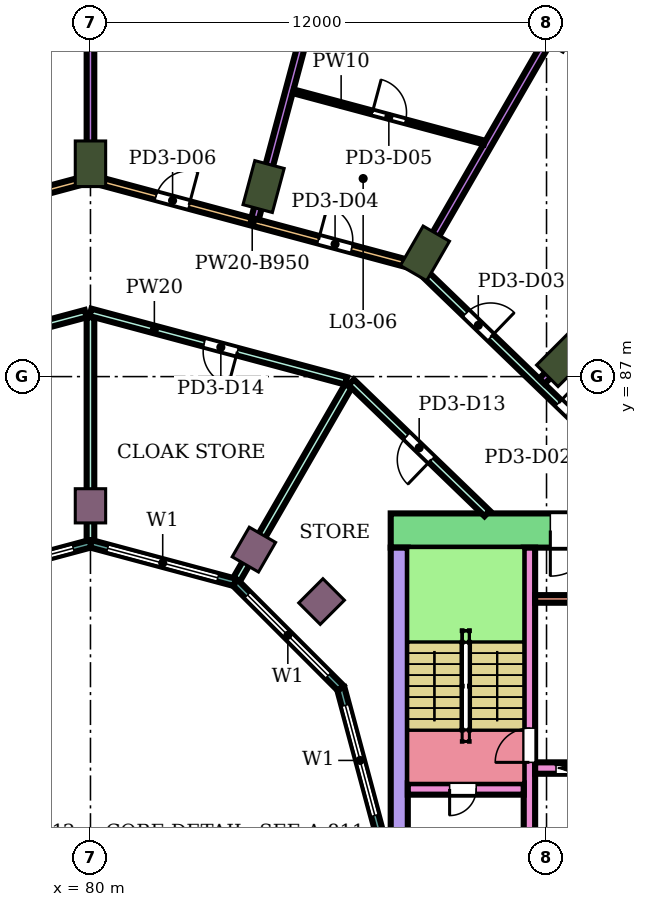
"""IFC4 building model, lengths in metres.
Left out: names, types, materials, properties, quantities, classifications, styles, units other than length and angle.
Written with IfcOpenShell. Run it as: python <this file> out.ifc"""

import sys

from ifc_helpers import new_model, si_unit, direction, frame, frame_2d, origin, origin_2d, place, context, subcontext, project, spatial, rectangle, extrude, element, fill, save


model = new_model("IFC4")
c1 = context("Model", 3, precision=1e-05, world=origin(), true_north=direction((0.0, 1.0)))
c2 = subcontext(c1, "Body", "Model", "MODEL_VIEW")
j1 = project(units=[si_unit("LENGTHUNIT", "METRE"), si_unit("PLANEANGLEUNIT", "RADIAN")], contexts=[c1])
p1 = place(None, origin())
s1 = spatial("IfcSite", under=j1, at=p1, CompositionType="ELEMENT")
p2 = place(p1, origin())
s2 = spatial("IfcBuilding", under=s1, at=p2, CompositionType="ELEMENT")
p3 = place(p2, frame((0.0, 0.0, 17.8)))
s3 = spatial("IfcBuildingStorey", under=s2, at=p3, CompositionType="ELEMENT", Elevation=17.8)
for number, where, z_axis, x_axis in (
    (1, (92.445, 87.445, 0.0), (0.0, 0.0, 1.0), (0.707, 0.707, 0.0)),
    (2, (88.8, 90.242, 0.0), (0.0, 0.0, 1.0), (0.5, 0.866, 0.0)),
    (3, (84.555, 92.0, 0.0), (0.0, 0.0, 1.0), (0.259, 0.966, 0.0)),
    (4, (80.0, 92.6, 0.0), (0.0, 0.0, 1.0), (0.0, 1.0, 0.0)),
):
    element("IfcColumn", number, at=place(p3, frame(where, z_axis=z_axis, x_axis=x_axis)), inside=s3, PredefinedType="COLUMN", context=c2, shape_type="SweptSolid", body=[
        extrude(rectangle(XDim=1.2, YDim=0.8, at=origin_2d()), origin(), (0.0, 0.0, 1.0), 6.0),
    ])
for number, where, z_axis, x_axis in (
    (5, (86.081, 81.081, 0.0), (0.0, 0.0, 1.0), (0.707, 0.707, 0.0)),
    (6, (84.3, 82.448, 0.0), (0.0, 0.0, 1.0), (0.5, 0.866, 0.0)),
    (7, (80.0, 83.6, 0.0), (0.0, 0.0, 1.0), (0.0, 1.0, 0.0)),
):
    element("IfcColumn", number, at=place(p3, frame(where, z_axis=z_axis, x_axis=x_axis)), inside=s3, PredefinedType="COLUMN", context=c2, shape_type="SweptSolid", body=[
        extrude(rectangle(XDim=0.9, YDim=0.8, at=origin_2d()), origin(), (0.0, 0.0, 1.0), 6.0),
    ])
p4 = place(p3, frame((87.9, 82.95, 0.0), z_axis=(0.0, 0.0, 1.0), x_axis=(1.0, 0.0, 0.0)))
e8 = element("IfcWall", 8, at=p4, inside=s3, PredefinedType="SHEAR", context=c2, shape_type="SweptSolid", body=[
    extrude(rectangle(XDim=14.6, YDim=0.9, at=frame_2d((7.3, 0.0))), origin(), (0.0, 0.0, 1.0), 5.55),
])
p5 = place(p4, frame((4.2, 0.0, 0.0)))
e9 = element("IfcOpeningElement", 9, at=p5, cuts=e8, PredefinedType="OPENING", context=c2, shape_type="SweptSolid", body=[
    extrude(rectangle(XDim=2.4, YDim=2.4, at=frame_2d((1.2, 1.2))), frame((0.0, 0.46, 0.0), z_axis=(0.0, -1.0, 0.0), x_axis=(1.0, 0.0, 0.0)), (0.0, 0.0, 1.0), 0.92),
])
p6 = place(p3, frame((88.125, 75.0, 0.0), z_axis=(0.0, 0.0, 1.0), x_axis=(0.0, 1.0, 0.0)))
e10 = element("IfcWall", 10, at=p6, inside=s3, PredefinedType="SHEAR", context=c2, shape_type="SweptSolid", body=[
    extrude(rectangle(XDim=7.5, YDim=0.45, at=frame_2d((3.75, 0.0))), origin(), (0.0, 0.0, 1.0), 5.55),
])
p7 = place(p3, frame((91.55, 75.0, 0.0), z_axis=(0.0, 0.0, 1.0), x_axis=(0.0, 1.0, 0.0)))
e11 = element("IfcWall", 11, at=p7, inside=s3, PredefinedType="SHEAR", context=c2, shape_type="SweptSolid", body=[
    extrude(rectangle(XDim=7.5, YDim=0.3, at=frame_2d((3.75, 0.0))), origin(), (0.0, 0.0, 1.0), 5.55),
])
p8 = place(p7, frame((1.85, 0.0, 0.0)))
e12 = element("IfcOpeningElement", 12, at=p8, cuts=e11, PredefinedType="OPENING", context=c2, shape_type="SweptSolid", body=[
    extrude(rectangle(XDim=0.9, YDim=2.1, at=frame_2d((0.45, 1.05))), frame((0.0, 0.16, 0.0), z_axis=(0.0, -1.0, 0.0), x_axis=(1.0, 0.0, 0.0)), (0.0, 0.0, 1.0), 0.32),
])
p9 = place(p3, frame((88.35, 76.15, 0.0), z_axis=(0.0, 0.0, 1.0), x_axis=(1.0, 0.0, 0.0)))
e13 = element("IfcWall", 13, at=p9, inside=s3, PredefinedType="SHEAR", context=c2, shape_type="SweptSolid", body=[
    extrude(rectangle(XDim=3.05, YDim=0.3, at=frame_2d((1.525, 0.0))), origin(), (0.0, 0.0, 1.0), 5.55),
])
p10 = place(p9, frame((1.1, 0.0, 0.0)))
e14 = element("IfcOpeningElement", 14, at=p10, cuts=e13, PredefinedType="OPENING", context=c2, shape_type="SweptSolid", body=[
    extrude(rectangle(XDim=0.7, YDim=2.0, at=frame_2d((0.35, 1.0))), frame((0.0, 0.16, 0.0), z_axis=(0.0, -1.0, 0.0), x_axis=(1.0, 0.0, 0.0)), (0.0, 0.0, 1.0), 0.32),
])
p11 = place(p3, frame((91.7, 76.7, 0.0), z_axis=(0.0, 0.0, 1.0), x_axis=(1.0, 0.0, 0.0)))
e15 = element("IfcWall", 15, at=p11, inside=s3, PredefinedType="SHEAR", context=c2, shape_type="SweptSolid", body=[
    extrude(rectangle(XDim=10.8, YDim=0.3, at=frame_2d((5.4, 0.0))), origin(), (0.0, 0.0, 1.0), 5.55),
])
p12 = place(p11, frame((0.55, 0.0, 0.0)))
e16 = element("IfcOpeningElement", 16, at=p12, cuts=e15, PredefinedType="OPENING", context=c2, shape_type="SweptSolid", body=[
    extrude(rectangle(XDim=1.1, YDim=2.1, at=frame_2d((0.55, 1.05))), frame((0.0, 0.16, 0.0), z_axis=(0.0, -1.0, 0.0), x_axis=(1.0, 0.0, 0.0)), (0.0, 0.0, 1.0), 0.32),
])
p13 = place(p11, frame((8.1, 0.0, 0.0)))
e17 = element("IfcOpeningElement", 17, at=p13, cuts=e15, PredefinedType="OPENING", context=c2, shape_type="SweptSolid", body=[
    extrude(rectangle(XDim=1.0, YDim=2.1, at=frame_2d((0.5, 1.05))), frame((0.0, 0.16, 0.0), z_axis=(0.0, -1.0, 0.0), x_axis=(1.0, 0.0, 0.0)), (0.0, 0.0, 1.0), 0.32),
])
p14 = place(p3, frame((91.7, 81.15, 0.0), z_axis=(0.0, 0.0, 1.0), x_axis=(1.0, 0.0, 0.0)))
e18 = element("IfcWall", 18, at=p14, inside=s3, PredefinedType="SHEAR", context=c2, shape_type="SweptSolid", body=[
    extrude(rectangle(XDim=4.85, YDim=0.2, at=frame_2d((2.425, 0.0))), origin(), (0.0, 0.0, 1.0), 5.55),
])
p15 = place(p3, frame((87.604, 75.0, 0.0), z_axis=(0.0, 0.0, 1.0), x_axis=(-0.258789828301, 0.965933654434, 0.0)))
e19 = element("IfcWall", 19, at=p15, inside=s3, PredefinedType="NOTDEFINED", context=c2, shape_type="SweptSolid", body=[
    extrude(rectangle(XDim=3.936, YDim=0.2, at=frame_2d((1.968, 0.0))), origin(), (0.0, 0.0, 1.0), 6.0),
])
p16 = place(p15, frame((0.468, 0.0, 0.9)))
e20 = element("IfcOpeningElement", 20, at=p16, cuts=e19, PredefinedType="OPENING", context=c2, shape_type="SweptSolid", body=[
    extrude(rectangle(XDim=3.0, YDim=2.3, at=frame_2d((1.5, 1.15))), frame((0.0, 0.11, 0.0), z_axis=(0.0, -1.0, 0.0), x_axis=(1.0, 0.0, 0.0)), (0.0, 0.0, 1.0), 0.22),
])
p17 = place(p3, frame((86.585, 78.802, 0.0), z_axis=(0.0, 0.0, 1.0), x_axis=(-0.707106781187, 0.707106781187, 0.0)))
e21 = element("IfcWall", 21, at=p17, inside=s3, PredefinedType="NOTDEFINED", context=c2, shape_type="SweptSolid", body=[
    extrude(rectangle(XDim=3.936, YDim=0.2, at=frame_2d((1.968, 0.0))), origin(), (0.0, 0.0, 1.0), 6.0),
])
p18 = place(p17, frame((0.468, 0.0, 0.9)))
e22 = element("IfcOpeningElement", 22, at=p18, cuts=e21, PredefinedType="OPENING", context=c2, shape_type="SweptSolid", body=[
    extrude(rectangle(XDim=3.0, YDim=2.3, at=frame_2d((1.5, 1.15))), frame((0.0, 0.11, 0.0), z_axis=(0.0, -1.0, 0.0), x_axis=(1.0, 0.0, 0.0)), (0.0, 0.0, 1.0), 0.22),
])
p19 = place(p3, frame((83.802, 81.585, 0.0), z_axis=(0.0, 0.0, 1.0), x_axis=(-0.965933654434, 0.258789828301, 0.0)))
e23 = element("IfcWall", 23, at=p19, inside=s3, PredefinedType="NOTDEFINED", context=c2, shape_type="SweptSolid", body=[
    extrude(rectangle(XDim=3.936, YDim=0.2, at=frame_2d((1.968, 0.0))), origin(), (0.0, 0.0, 1.0), 6.0),
])
p20 = place(p19, frame((0.468, 0.0, 0.9)))
e24 = element("IfcOpeningElement", 24, at=p20, cuts=e23, PredefinedType="OPENING", context=c2, shape_type="SweptSolid", body=[
    extrude(rectangle(XDim=3.0, YDim=2.3, at=frame_2d((1.5, 1.15))), frame((0.0, 0.11, 0.0), z_axis=(0.0, -1.0, 0.0), x_axis=(1.0, 0.0, 0.0)), (0.0, 0.0, 1.0), 0.22),
])
p21 = place(p3, frame((80.0, 82.604, 0.0), z_axis=(0.0, 0.0, 1.0), x_axis=(-0.965933654434, -0.258789828301, 0.0)))
e25 = element("IfcWall", 25, at=p21, inside=s3, PredefinedType="NOTDEFINED", context=c2, shape_type="SweptSolid", body=[
    extrude(rectangle(XDim=3.936, YDim=0.2, at=frame_2d((1.968, 0.0))), origin(), (0.0, 0.0, 1.0), 6.0),
])
p22 = place(p21, frame((0.468, 0.0, 0.9)))
e26 = element("IfcOpeningElement", 26, at=p22, cuts=e25, PredefinedType="OPENING", context=c2, shape_type="SweptSolid", body=[
    extrude(rectangle(XDim=3.0, YDim=2.3, at=frame_2d((1.5, 1.15))), frame((0.0, 0.11, 0.0), z_axis=(0.0, -1.0, 0.0), x_axis=(1.0, 0.0, 0.0)), (0.0, 0.0, 1.0), 0.22),
])
p23 = place(p3, frame((71.411, 89.908, 0.0), z_axis=(0.0, 0.0, 1.0), x_axis=(0.965907314361, 0.258888122678, 0.0)))
e27 = element("IfcWall", 27, at=p23, inside=s3, PredefinedType="PARTITIONING", context=c2, shape_type="SweptSolid", body=[
    extrude(rectangle(XDim=8.802, YDim=0.2, at=frame_2d((4.401, 0.0))), origin(), (0.0, 0.0, 1.0), 5.05),
])
p24 = place(p23, frame((6.205, 0.0, 0.0)))
e28 = element("IfcOpeningElement", 28, at=p24, cuts=e27, PredefinedType="OPENING", context=c2, shape_type="SweptSolid", body=[
    extrude(rectangle(XDim=0.9, YDim=2.1, at=frame_2d((0.45, 1.05))), frame((0.0, 0.11, 0.0), z_axis=(0.0, -1.0, 0.0), x_axis=(1.0, 0.0, 0.0)), (0.0, 0.0, 1.0), 0.22),
])
p25 = place(p23, frame((1.779, 0.0, 0.0)))
e29 = element("IfcOpeningElement", 29, at=p25, cuts=e27, PredefinedType="OPENING", context=c2, shape_type="SweptSolid", body=[
    extrude(rectangle(XDim=0.9, YDim=2.1, at=frame_2d((0.45, 1.05))), frame((0.0, 0.11, 0.0), z_axis=(0.0, -1.0, 0.0), x_axis=(1.0, 0.0, 0.0)), (0.0, 0.0, 1.0), 0.22),
])
p26 = place(p3, frame((73.274, 86.888, 0.0), z_axis=(0.0, 0.0, 1.0), x_axis=(0.965941353683, 0.258761089124, 0.0)))
e30 = element("IfcWall", 30, at=p26, inside=s3, PredefinedType="PARTITIONING", context=c2, shape_type="SweptSolid", body=[
    extrude(rectangle(XDim=6.833, YDim=0.2, at=frame_2d((3.417, 0.0))), origin(), (0.0, 0.0, 1.0), 5.55),
])
p27 = place(p26, frame((2.961, 0.0, 0.0)))
e31 = element("IfcOpeningElement", 31, at=p27, cuts=e30, PredefinedType="OPENING", context=c2, shape_type="SweptSolid", body=[
    extrude(rectangle(XDim=0.9, YDim=2.1, at=frame_2d((0.45, 1.05))), frame((0.0, 0.11, 0.0), z_axis=(0.0, -1.0, 0.0), x_axis=(1.0, 0.0, 0.0)), (0.0, 0.0, 1.0), 0.22),
])
p28 = place(p3, frame((80.0, 82.699, 0.0), z_axis=(0.0, 0.0, 1.0), x_axis=(0.0, 1.0, 0.0)))
e32 = element("IfcWall", 32, at=p28, inside=s3, PredefinedType="PARTITIONING", context=c2, shape_type="SweptSolid", body=[
    extrude(rectangle(XDim=5.861, YDim=0.2, at=frame_2d((2.931, 0.0))), origin(), (0.0, 0.0, 1.0), 5.55),
])
p29 = place(p3, frame((80.0, 88.69, 0.0), z_axis=(0.0, 0.0, 1.0), x_axis=(0.965929896633, -0.258803853893, 0.0)))
e33 = element("IfcWall", 33, at=p29, inside=s3, PredefinedType="PARTITIONING", context=c2, shape_type="SweptSolid", body=[
    extrude(rectangle(XDim=6.963, YDim=0.2, at=frame_2d((3.481, 0.0))), origin(), (0.0, 0.0, 1.0), 5.55),
])
p30 = place(p29, frame((3.102, 0.0, 0.0)))
e34 = element("IfcOpeningElement", 34, at=p30, cuts=e33, PredefinedType="OPENING", context=c2, shape_type="SweptSolid", body=[
    extrude(rectangle(XDim=0.9, YDim=2.1, at=frame_2d((0.45, 1.05))), frame((0.0, 0.11, 0.0), z_axis=(0.0, -1.0, 0.0), x_axis=(1.0, 0.0, 0.0)), (0.0, 0.0, 1.0), 0.22),
])
p31 = place(p3, frame((80.0, 92.3, 0.0), z_axis=(0.0, 0.0, 1.0), x_axis=(0.0, 1.0, 0.0)))
e35 = element("IfcWall", 35, at=p31, inside=s3, PredefinedType="PARTITIONING", context=c2, shape_type="SweptSolid", body=[
    extrude(rectangle(XDim=14.998, YDim=0.2, at=frame_2d((7.499, 0.0))), origin(), (0.0, 0.0, 1.0), 4.55),
])
p32 = place(p3, frame((80.0, 92.21, 0.0), z_axis=(0.0, 0.0, 1.0), x_axis=(0.965910452724, -0.258876413213, 0.0)))
e36 = element("IfcWall", 36, at=p32, inside=s3, PredefinedType="PARTITIONING", context=c2, shape_type="SweptSolid", body=[
    extrude(rectangle(XDim=8.812, YDim=0.2, at=frame_2d((4.406, 0.0))), origin(), (0.0, 0.0, 1.0), 5.05),
])
p33 = place(p32, frame((6.213, 0.0, 0.0)))
e37 = element("IfcOpeningElement", 37, at=p33, cuts=e36, PredefinedType="OPENING", context=c2, shape_type="SweptSolid", body=[
    extrude(rectangle(XDim=0.9, YDim=2.1, at=frame_2d((0.45, 1.05))), frame((0.0, 0.11, 0.0), z_axis=(0.0, -1.0, 0.0), x_axis=(1.0, 0.0, 0.0)), (0.0, 0.0, 1.0), 0.22),
])
p34 = place(p32, frame((1.787, 0.0, 0.0)))
e38 = element("IfcOpeningElement", 38, at=p34, cuts=e36, PredefinedType="OPENING", context=c2, shape_type="SweptSolid", body=[
    extrude(rectangle(XDim=0.9, YDim=2.1, at=frame_2d((0.45, 1.05))), frame((0.0, 0.11, 0.0), z_axis=(0.0, -1.0, 0.0), x_axis=(1.0, 0.0, 0.0)), (0.0, 0.0, 1.0), 0.22),
])
p35 = place(p3, frame((83.849, 81.667, 0.0), z_axis=(0.0, 0.0, 1.0), x_axis=(0.500029580911, 0.866008324564, 0.0)))
e39 = element("IfcWall", 39, at=p35, inside=s3, PredefinedType="PARTITIONING", context=c2, shape_type="SweptSolid", body=[
    extrude(rectangle(XDim=5.872, YDim=0.2, at=frame_2d((2.936, 0.0))), origin(), (0.0, 0.0, 1.0), 5.55),
])
p36 = place(p3, frame((84.329, 91.153, 0.0), z_axis=(0.0, 0.0, 1.0), x_axis=(0.258918127652, 0.965899271753, 0.0)))
e40 = element("IfcWall", 40, at=p36, inside=s3, PredefinedType="PARTITIONING", context=c2, shape_type="SweptSolid", body=[
    extrude(rectangle(XDim=15.574, YDim=0.2, at=frame_2d((7.787, 0.0))), origin(), (0.0, 0.0, 1.0), 4.55),
])
p37 = place(p3, frame((86.861, 86.852, 0.0), z_axis=(0.0, 0.0, 1.0), x_axis=(0.719448855188, -0.694545423114, 0.0)))
e41 = element("IfcWall", 41, at=p37, inside=s3, PredefinedType="PARTITIONING", context=c2, shape_type="SweptSolid", body=[
    extrude(rectangle(XDim=4.97, YDim=0.2, at=frame_2d((2.485, 0.0))), origin(), (0.0, 0.0, 1.0), 5.55),
])
p38 = place(p37, frame((2.035, 0.0, 0.0)))
e42 = element("IfcOpeningElement", 42, at=p38, cuts=e41, PredefinedType="OPENING", context=c2, shape_type="SweptSolid", body=[
    extrude(rectangle(XDim=0.9, YDim=2.1, at=frame_2d((0.45, 1.05))), frame((0.0, 0.11, 0.0), z_axis=(0.0, -1.0, 0.0), x_axis=(1.0, 0.0, 0.0)), (0.0, 0.0, 1.0), 0.22),
])
p39 = place(p3, frame((88.669, 89.833, 0.0), z_axis=(0.0, 0.0, 1.0), x_axis=(0.719424754683, -0.694570386893, 0.0)))
e43 = element("IfcWall", 43, at=p39, inside=s3, PredefinedType="PARTITIONING", context=c2, shape_type="SweptSolid", body=[
    extrude(rectangle(XDim=7.043, YDim=0.2, at=frame_2d((3.521, 0.0))), origin(), (0.0, 0.0, 1.0), 5.55),
])
p40 = place(p39, frame((5.074, 0.0, 0.0)))
e44 = element("IfcOpeningElement", 44, at=p40, cuts=e43, PredefinedType="OPENING", context=c2, shape_type="SweptSolid", body=[
    extrude(rectangle(XDim=0.9, YDim=2.1, at=frame_2d((0.45, 1.05))), frame((0.0, 0.11, 0.0), z_axis=(0.0, -1.0, 0.0), x_axis=(1.0, 0.0, 0.0)), (0.0, 0.0, 1.0), 0.22),
])
p41 = place(p39, frame((1.684, 0.0, 0.0)))
e45 = element("IfcOpeningElement", 45, at=p41, cuts=e43, PredefinedType="OPENING", context=c2, shape_type="SweptSolid", body=[
    extrude(rectangle(XDim=0.9, YDim=2.1, at=frame_2d((0.45, 1.05))), frame((0.0, 0.11, 0.0), z_axis=(0.0, -1.0, 0.0), x_axis=(1.0, 0.0, 0.0)), (0.0, 0.0, 1.0), 0.22),
])
p42 = place(p3, frame((88.601, 89.897, 0.0), z_axis=(0.0, 0.0, 1.0), x_axis=(0.500043970552, 0.866000015886, 0.0)))
e46 = element("IfcWall", 46, at=p42, inside=s3, PredefinedType="PARTITIONING", context=c2, shape_type="SweptSolid", body=[
    extrude(rectangle(XDim=15.096, YDim=0.2, at=frame_2d((7.548, 0.0))), origin(), (0.0, 0.0, 1.0), 4.55),
])
p43 = place(p3, frame((91.876, 86.876, 0.0), z_axis=(0.0, 0.0, 1.0), x_axis=(0.707106781187, 0.707106781187, 0.0)))
e47 = element("IfcWall", 47, at=p43, inside=s3, PredefinedType="PARTITIONING", context=c2, shape_type="SweptSolid", body=[
    extrude(rectangle(XDim=15.503, YDim=0.2, at=frame_2d((7.752, 0.0))), origin(), (0.0, 0.0, 1.0), 4.55),
])
p44 = place(p3, frame((85.34, 94.506, 0.0), z_axis=(0.0, 0.0, 1.0), x_axis=(0.965895847634, -0.258930901058, 0.0)))
e48 = element("IfcWall", 48, at=p44, inside=s3, PredefinedType="PARTITIONING", context=c2, shape_type="SweptSolid", body=[
    extrude(rectangle(XDim=5.199, YDim=0.1, at=frame_2d((2.6, 0.0))), origin(), (0.0, 0.0, 1.0), 5.55),
])
p45 = place(p44, frame((2.149, 0.0, 0.0)))
e49 = element("IfcOpeningElement", 49, at=p45, cuts=e48, PredefinedType="OPENING", context=c2, shape_type="SweptSolid", body=[
    extrude(rectangle(XDim=0.9, YDim=2.1, at=frame_2d((0.45, 1.05))), frame((0.0, 0.06, 0.0), z_axis=(0.0, -1.0, 0.0), x_axis=(1.0, 0.0, 0.0)), (0.0, 0.0, 1.0), 0.12),
])
p46 = place(p16, origin())
e50 = element("IfcWindow", 50, at=p46, inside=s3, PartitioningType="SINGLE_PANEL", PredefinedType="WINDOW", context=c2, shape_type="SweptSolid", body=[
    extrude(rectangle(XDim=3.0, YDim=2.3, at=frame_2d((1.5, 1.15))), frame((0.0, 0.03, 0.0), z_axis=(0.0, -1.0, 0.0), x_axis=(1.0, 0.0, 0.0)), (0.0, 0.0, 1.0), 0.06),
])
fill(e20, e50)
p47 = place(p18, origin())
e51 = element("IfcWindow", 51, at=p47, inside=s3, PartitioningType="SINGLE_PANEL", PredefinedType="WINDOW", context=c2, shape_type="SweptSolid", body=[
    extrude(rectangle(XDim=3.0, YDim=2.3, at=frame_2d((1.5, 1.15))), frame((0.0, 0.03, 0.0), z_axis=(0.0, -1.0, 0.0), x_axis=(1.0, 0.0, 0.0)), (0.0, 0.0, 1.0), 0.06),
])
fill(e22, e51)
p48 = place(p20, origin())
e52 = element("IfcWindow", 52, at=p48, inside=s3, PartitioningType="SINGLE_PANEL", PredefinedType="WINDOW", context=c2, shape_type="SweptSolid", body=[
    extrude(rectangle(XDim=3.0, YDim=2.3, at=frame_2d((1.5, 1.15))), frame((0.0, 0.03, 0.0), z_axis=(0.0, -1.0, 0.0), x_axis=(1.0, 0.0, 0.0)), (0.0, 0.0, 1.0), 0.06),
])
fill(e24, e52)
p49 = place(p22, origin())
e53 = element("IfcWindow", 53, at=p49, inside=s3, PartitioningType="SINGLE_PANEL", PredefinedType="WINDOW", context=c2, shape_type="SweptSolid", body=[
    extrude(rectangle(XDim=3.0, YDim=2.3, at=frame_2d((1.5, 1.15))), frame((0.0, 0.03, 0.0), z_axis=(0.0, -1.0, 0.0), x_axis=(1.0, 0.0, 0.0)), (0.0, 0.0, 1.0), 0.06),
])
fill(e26, e53)
p50 = place(p40, origin())
e54 = element("IfcDoor", 54, at=p50, inside=s3, OperationType="SINGLE_SWING_LEFT", PredefinedType="DOOR", context=c2, shape_type="SweptSolid", body=[
    extrude(rectangle(XDim=0.9, YDim=2.1, at=frame_2d((0.45, 1.05))), frame((0.0, 0.025, 0.0), z_axis=(0.0, -1.0, 0.0), x_axis=(1.0, 0.0, 0.0)), (0.0, 0.0, 1.0), 0.05),
])
fill(e44, e54)
p51 = place(p41, origin())
e55 = element("IfcDoor", 55, at=p51, inside=s3, OperationType="SINGLE_SWING_RIGHT", PredefinedType="DOOR", context=c2, shape_type="SweptSolid", body=[
    extrude(rectangle(XDim=0.9, YDim=2.1, at=frame_2d((0.45, 1.05))), frame((0.0, 0.025, 0.0), z_axis=(0.0, -1.0, 0.0), x_axis=(1.0, 0.0, 0.0)), (0.0, 0.0, 1.0), 0.05),
])
fill(e45, e55)
p52 = place(p33, origin())
e56 = element("IfcDoor", 56, at=p52, inside=s3, OperationType="SINGLE_SWING_LEFT", PredefinedType="DOOR", context=c2, shape_type="SweptSolid", body=[
    extrude(rectangle(XDim=0.9, YDim=2.1, at=frame_2d((0.45, 1.05))), frame((0.0, 0.025, 0.0), z_axis=(0.0, -1.0, 0.0), x_axis=(1.0, 0.0, 0.0)), (0.0, 0.0, 1.0), 0.05),
])
fill(e37, e56)
p53 = place(p45, origin())
e57 = element("IfcDoor", 57, at=p53, inside=s3, OperationType="SINGLE_SWING_LEFT", PredefinedType="DOOR", context=c2, shape_type="SweptSolid", body=[
    extrude(rectangle(XDim=0.9, YDim=2.1, at=frame_2d((0.45, 1.05))), frame((0.0, 0.025, 0.0), z_axis=(0.0, -1.0, 0.0), x_axis=(1.0, 0.0, 0.0)), (0.0, 0.0, 1.0), 0.05),
])
fill(e49, e57)
p54 = place(p34, origin())
e58 = element("IfcDoor", 58, at=p54, inside=s3, OperationType="SINGLE_SWING_RIGHT", PredefinedType="DOOR", context=c2, shape_type="SweptSolid", body=[
    extrude(rectangle(XDim=0.9, YDim=2.1, at=frame_2d((0.45, 1.05))), frame((0.0, 0.025, 0.0), z_axis=(0.0, -1.0, 0.0), x_axis=(1.0, 0.0, 0.0)), (0.0, 0.0, 1.0), 0.05),
])
fill(e38, e58)
p55 = place(p38, frame((0.9, 0.0, 0.0), z_axis=(0.0, 0.0, 1.0), x_axis=(-1.0, 0.0, 0.0)))
e59 = element("IfcDoor", 59, at=p55, inside=s3, OperationType="SINGLE_SWING_LEFT", PredefinedType="DOOR", context=c2, shape_type="SweptSolid", body=[
    extrude(rectangle(XDim=0.9, YDim=2.1, at=frame_2d((0.45, 1.05))), frame((0.0, 0.025, 0.0), z_axis=(0.0, -1.0, 0.0), x_axis=(1.0, 0.0, 0.0)), (0.0, 0.0, 1.0), 0.05),
])
fill(e42, e59)
p56 = place(p30, frame((0.9, 0.0, 0.0), z_axis=(0.0, 0.0, 1.0), x_axis=(-1.0, 0.0, 0.0)))
e60 = element("IfcDoor", 60, at=p56, inside=s3, OperationType="SINGLE_SWING_LEFT", PredefinedType="DOOR", context=c2, shape_type="SweptSolid", body=[
    extrude(rectangle(XDim=0.9, YDim=2.1, at=frame_2d((0.45, 1.05))), frame((0.0, 0.025, 0.0), z_axis=(0.0, -1.0, 0.0), x_axis=(1.0, 0.0, 0.0)), (0.0, 0.0, 1.0), 0.05),
])
fill(e34, e60)
p57 = place(p10, frame((0.7, 0.0, 0.0), z_axis=(0.0, 0.0, 1.0), x_axis=(-1.0, 0.0, 0.0)))
e61 = element("IfcDoor", 61, at=p57, inside=s3, OperationType="SINGLE_SWING_RIGHT", PredefinedType="DOOR", context=c2, shape_type="SweptSolid", body=[
    extrude(rectangle(XDim=0.7, YDim=2.0, at=frame_2d((0.35, 1.0))), frame((0.0, 0.025, 0.0), z_axis=(0.0, -1.0, 0.0), x_axis=(1.0, 0.0, 0.0)), (0.0, 0.0, 1.0), 0.05),
])
fill(e14, e61)
p58 = place(p8, origin())
e62 = element("IfcDoor", 62, at=p58, inside=s3, OperationType="SINGLE_SWING_LEFT", PredefinedType="DOOR", context=c2, shape_type="SweptSolid", body=[
    extrude(rectangle(XDim=0.9, YDim=2.1, at=frame_2d((0.45, 1.05))), frame((0.0, 0.025, 0.0), z_axis=(0.0, -1.0, 0.0), x_axis=(1.0, 0.0, 0.0)), (0.0, 0.0, 1.0), 0.05),
])
fill(e12, e62)
p59 = place(p12, origin())
e63 = element("IfcDoor", 63, at=p59, inside=s3, OperationType="DOUBLE_DOOR_SLIDING", PredefinedType="DOOR", context=c2, shape_type="SweptSolid", body=[
    extrude(rectangle(XDim=1.1, YDim=2.1, at=frame_2d((0.55, 1.05))), frame((0.0, 0.025, 0.0), z_axis=(0.0, -1.0, 0.0), x_axis=(1.0, 0.0, 0.0)), (0.0, 0.0, 1.0), 0.05),
])
fill(e16, e63)
p60 = place(p5, frame((2.4, 0.0, 0.0), z_axis=(0.0, 0.0, 1.0), x_axis=(-1.0, 0.0, 0.0)))
e64 = element("IfcDoor", 64, at=p60, inside=s3, OperationType="DOUBLE_DOOR_SINGLE_SWING", PredefinedType="DOOR", context=c2, shape_type="SweptSolid", body=[
    extrude(rectangle(XDim=2.4, YDim=2.4, at=frame_2d((1.2, 1.2))), frame((0.0, 0.025, 0.0), z_axis=(0.0, -1.0, 0.0), x_axis=(1.0, 0.0, 0.0)), (0.0, 0.0, 1.0), 0.05),
])
fill(e9, e64)
save(model, sys.argv[1])
